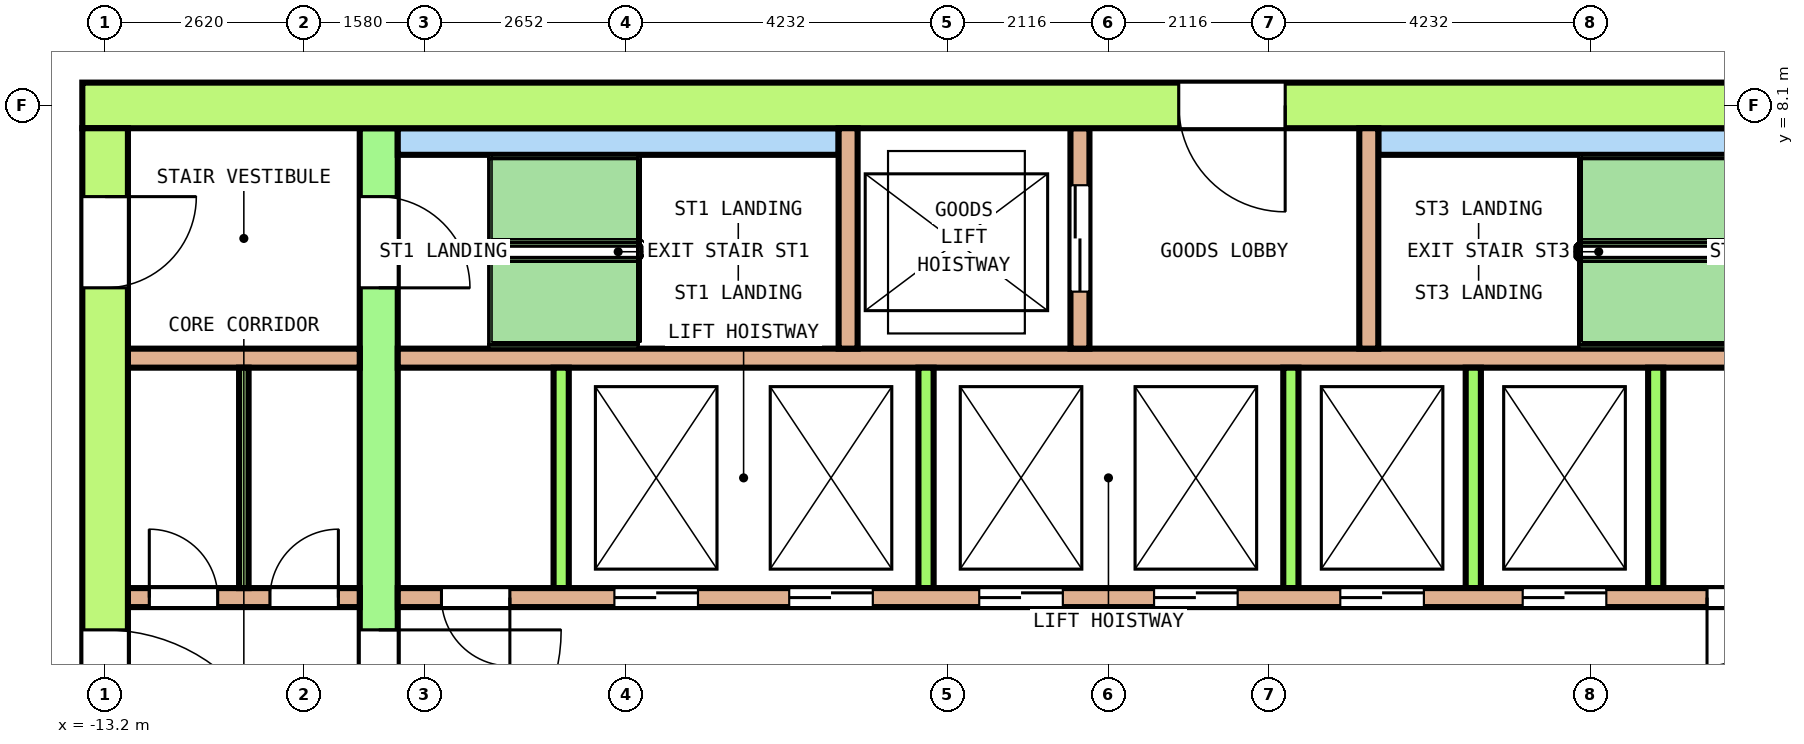
"""IFC4 building model, lengths in metres.
Left out: names, types, materials, properties, quantities, classifications, styles, units other than length and angle.
Written with IfcOpenShell. Run it as: python <this file> out.ifc"""

import sys

from ifc_helpers import new_model, si_unit, direction, frame, frame_2d, origin, place, context, subcontext, project, spatial, rectangle, extrude, element, fill, save


model = new_model("IFC4")
c1 = context("Model", 3, precision=1e-05, world=origin(), true_north=direction((0.0, 1.0)))
c2 = subcontext(c1, "Body", "Model", "MODEL_VIEW")
j1 = project(units=[si_unit("LENGTHUNIT", "METRE"), si_unit("PLANEANGLEUNIT", "RADIAN")], contexts=[c1])
p1 = place(None, origin())
s1 = spatial("IfcSite", under=j1, at=p1, CompositionType="ELEMENT")
p2 = place(p1, origin())
s2 = spatial("IfcBuilding", under=s1, at=p2, CompositionType="ELEMENT")
p3 = place(p2, frame((0.0, 0.0, 231.4)))
s3 = spatial("IfcBuildingStorey", under=s2, at=p3, CompositionType="ELEMENT", Elevation=231.4)
p4 = place(p3, frame((-13.5, 8.1, 0.0), z_axis=(0.0, 0.0, 1.0), x_axis=(1.0, 0.0, 0.0)))
e1 = element("IfcWall", 1, at=p4, inside=s3, PredefinedType="SHEAR", context=c2, shape_type="SweptSolid", body=[
    extrude(rectangle(XDim=27.0, YDim=0.6, at=frame_2d((13.5, 0.0))), origin(), (0.0, 0.0, 1.0), 5.7),
])
p5 = place(p4, frame((14.425, 0.0, 0.0)))
e2 = element("IfcOpeningElement", 2, at=p5, cuts=e1, PredefinedType="OPENING", context=c2, shape_type="SweptSolid", body=[
    extrude(rectangle(XDim=1.4, YDim=2.1, at=frame_2d((0.7, 1.05))), frame((0.0, 0.31, 0.0), z_axis=(0.0, -1.0, 0.0), x_axis=(1.0, 0.0, 0.0)), (0.0, 0.0, 1.0), 0.62),
])
p6 = place(p3, frame((-13.2, -7.8, 0.0), z_axis=(0.0, 0.0, 1.0), x_axis=(0.0, 1.0, 0.0)))
e3 = element("IfcWall", 3, at=p6, inside=s3, PredefinedType="SHEAR", context=c2, shape_type="SweptSolid", body=[
    extrude(rectangle(XDim=15.6, YDim=0.6, at=frame_2d((7.8, 0.0))), origin(), (0.0, 0.0, 1.0), 5.7),
])
p7 = place(p6, frame((6.6, 0.0, 0.0)))
e4 = element("IfcOpeningElement", 4, at=p7, cuts=e3, PredefinedType="OPENING", context=c2, shape_type="SweptSolid", body=[
    extrude(rectangle(XDim=2.4, YDim=2.1, at=frame_2d((1.2, 1.05))), frame((0.0, 0.31, 0.0), z_axis=(0.0, -1.0, 0.0), x_axis=(1.0, 0.0, 0.0)), (0.0, 0.0, 1.0), 0.62),
])
p8 = place(p6, frame((13.5, 0.0, 0.0)))
e5 = element("IfcOpeningElement", 5, at=p8, cuts=e3, PredefinedType="OPENING", context=c2, shape_type="SweptSolid", body=[
    extrude(rectangle(XDim=1.2, YDim=2.1, at=frame_2d((0.6, 1.05))), frame((0.0, 0.31, 0.0), z_axis=(0.0, -1.0, 0.0), x_axis=(1.0, 0.0, 0.0)), (0.0, 0.0, 1.0), 0.62),
])
p9 = place(p6, frame((0.9, 0.0, 0.0)))
e6 = element("IfcOpeningElement", 6, at=p9, cuts=e3, PredefinedType="OPENING", context=c2, shape_type="SweptSolid", body=[
    extrude(rectangle(XDim=1.2, YDim=2.1, at=frame_2d((0.6, 1.05))), frame((0.0, 0.31, 0.0), z_axis=(0.0, -1.0, 0.0), x_axis=(1.0, 0.0, 0.0)), (0.0, 0.0, 1.0), 0.62),
])
p10 = place(p3, frame((-9.6, -7.8, 0.0), z_axis=(0.0, 0.0, 1.0), x_axis=(0.0, 1.0, 0.0)))
e7 = element("IfcWall", 7, at=p10, inside=s3, PredefinedType="SHEAR", context=c2, shape_type="SweptSolid", body=[
    extrude(rectangle(XDim=15.6, YDim=0.5, at=frame_2d((7.8, 0.0))), origin(), (0.0, 0.0, 1.0), 5.7),
])
p11 = place(p10, frame((6.6, 0.0, 0.0)))
e8 = element("IfcOpeningElement", 8, at=p11, cuts=e7, PredefinedType="OPENING", context=c2, shape_type="SweptSolid", body=[
    extrude(rectangle(XDim=2.4, YDim=2.1, at=frame_2d((1.2, 1.05))), frame((0.0, 0.26, 0.0), z_axis=(0.0, -1.0, 0.0), x_axis=(1.0, 0.0, 0.0)), (0.0, 0.0, 1.0), 0.52),
])
p12 = place(p10, frame((13.5, 0.0, 0.0)))
e9 = element("IfcOpeningElement", 9, at=p12, cuts=e7, PredefinedType="OPENING", context=c2, shape_type="SweptSolid", body=[
    extrude(rectangle(XDim=1.2, YDim=2.1, at=frame_2d((0.6, 1.05))), frame((0.0, 0.26, 0.0), z_axis=(0.0, -1.0, 0.0), x_axis=(1.0, 0.0, 0.0)), (0.0, 0.0, 1.0), 0.52),
])
p13 = place(p10, frame((0.9, 0.0, 0.0)))
e10 = element("IfcOpeningElement", 10, at=p13, cuts=e7, PredefinedType="OPENING", context=c2, shape_type="SweptSolid", body=[
    extrude(rectangle(XDim=1.2, YDim=2.1, at=frame_2d((0.6, 1.05))), frame((0.0, 0.26, 0.0), z_axis=(0.0, -1.0, 0.0), x_axis=(1.0, 0.0, 0.0)), (0.0, 0.0, 1.0), 0.52),
])
p14 = place(p3, frame((-12.9, 1.625, 0.0), z_axis=(0.0, 0.0, 1.0), x_axis=(1.0, 0.0, 0.0)))
e11 = element("IfcWall", 11, at=p14, inside=s3, PredefinedType="SOLIDWALL", context=c2, shape_type="SweptSolid", body=[
    extrude(rectangle(XDim=3.05, YDim=0.25, at=frame_2d((1.525, 0.0))), origin(), (0.0, 0.0, 1.0), 5.7),
])
p15 = place(p14, frame((0.281, 0.0, 0.0)))
e12 = element("IfcOpeningElement", 12, at=p15, cuts=e11, PredefinedType="OPENING", context=c2, shape_type="SweptSolid", body=[
    extrude(rectangle(XDim=0.9, YDim=2.1, at=frame_2d((0.45, 1.05))), frame((0.0, 0.135, 0.0), z_axis=(0.0, -1.0, 0.0), x_axis=(1.0, 0.0, 0.0)), (0.0, 0.0, 1.0), 0.27),
])
p16 = place(p14, frame((1.869, 0.0, 0.0)))
e13 = element("IfcOpeningElement", 13, at=p16, cuts=e11, PredefinedType="OPENING", context=c2, shape_type="SweptSolid", body=[
    extrude(rectangle(XDim=0.9, YDim=2.1, at=frame_2d((0.45, 1.05))), frame((0.0, 0.135, 0.0), z_axis=(0.0, -1.0, 0.0), x_axis=(1.0, 0.0, 0.0)), (0.0, 0.0, 1.0), 0.27),
])
p17 = place(p3, frame((-9.35, 1.625, 0.0), z_axis=(0.0, 0.0, 1.0), x_axis=(1.0, 0.0, 0.0)))
e14 = element("IfcWall", 14, at=p17, inside=s3, PredefinedType="SOLIDWALL", context=c2, shape_type="SweptSolid", body=[
    extrude(rectangle(XDim=18.7, YDim=0.25, at=frame_2d((9.35, 0.0))), origin(), (0.0, 0.0, 1.0), 5.7),
])
p18 = place(p17, frame((2.85, 0.0, 0.0)))
e15 = element("IfcOpeningElement", 15, at=p18, cuts=e14, PredefinedType="OPENING", context=c2, shape_type="SweptSolid", body=[
    extrude(rectangle(XDim=1.1, YDim=2.1, at=frame_2d((0.55, 1.05))), frame((0.0, 0.135, 0.0), z_axis=(0.0, -1.0, 0.0), x_axis=(1.0, 0.0, 0.0)), (0.0, 0.0, 1.0), 0.27),
])
p19 = place(p17, frame((5.15, 0.0, 0.0)))
e16 = element("IfcOpeningElement", 16, at=p19, cuts=e14, PredefinedType="OPENING", context=c2, shape_type="SweptSolid", body=[
    extrude(rectangle(XDim=1.1, YDim=2.1, at=frame_2d((0.55, 1.05))), frame((0.0, 0.135, 0.0), z_axis=(0.0, -1.0, 0.0), x_axis=(1.0, 0.0, 0.0)), (0.0, 0.0, 1.0), 0.27),
])
p20 = place(p17, frame((7.65, 0.0, 0.0)))
e17 = element("IfcOpeningElement", 17, at=p20, cuts=e14, PredefinedType="OPENING", context=c2, shape_type="SweptSolid", body=[
    extrude(rectangle(XDim=1.1, YDim=2.1, at=frame_2d((0.55, 1.05))), frame((0.0, 0.135, 0.0), z_axis=(0.0, -1.0, 0.0), x_axis=(1.0, 0.0, 0.0)), (0.0, 0.0, 1.0), 0.27),
])
p21 = place(p17, frame((9.95, 0.0, 0.0)))
e18 = element("IfcOpeningElement", 18, at=p21, cuts=e14, PredefinedType="OPENING", context=c2, shape_type="SweptSolid", body=[
    extrude(rectangle(XDim=1.1, YDim=2.1, at=frame_2d((0.55, 1.05))), frame((0.0, 0.135, 0.0), z_axis=(0.0, -1.0, 0.0), x_axis=(1.0, 0.0, 0.0)), (0.0, 0.0, 1.0), 0.27),
])
p22 = place(p17, frame((12.4, 0.0, 0.0)))
e19 = element("IfcOpeningElement", 19, at=p22, cuts=e14, PredefinedType="OPENING", context=c2, shape_type="SweptSolid", body=[
    extrude(rectangle(XDim=1.1, YDim=2.1, at=frame_2d((0.55, 1.05))), frame((0.0, 0.135, 0.0), z_axis=(0.0, -1.0, 0.0), x_axis=(1.0, 0.0, 0.0)), (0.0, 0.0, 1.0), 0.27),
])
p23 = place(p17, frame((14.8, 0.0, 0.0)))
e20 = element("IfcOpeningElement", 20, at=p23, cuts=e14, PredefinedType="OPENING", context=c2, shape_type="SweptSolid", body=[
    extrude(rectangle(XDim=1.1, YDim=2.1, at=frame_2d((0.55, 1.05))), frame((0.0, 0.135, 0.0), z_axis=(0.0, -1.0, 0.0), x_axis=(1.0, 0.0, 0.0)), (0.0, 0.0, 1.0), 0.27),
])
p24 = place(p17, frame((0.575, 0.0, 0.0)))
e21 = element("IfcOpeningElement", 21, at=p24, cuts=e14, PredefinedType="OPENING", context=c2, shape_type="SweptSolid", body=[
    extrude(rectangle(XDim=0.9, YDim=2.1, at=frame_2d((0.45, 1.05))), frame((0.0, 0.135, 0.0), z_axis=(0.0, -1.0, 0.0), x_axis=(1.0, 0.0, 0.0)), (0.0, 0.0, 1.0), 0.27),
])
p25 = place(p17, frame((17.225, 0.0, 0.0)))
e22 = element("IfcOpeningElement", 22, at=p25, cuts=e14, PredefinedType="OPENING", context=c2, shape_type="SweptSolid", body=[
    extrude(rectangle(XDim=0.9, YDim=2.1, at=frame_2d((0.45, 1.05))), frame((0.0, 0.135, 0.0), z_axis=(0.0, -1.0, 0.0), x_axis=(1.0, 0.0, 0.0)), (0.0, 0.0, 1.0), 0.27),
])
p26 = place(p3, frame((-12.9, 4.775, 0.0), z_axis=(0.0, 0.0, 1.0), x_axis=(1.0, 0.0, 0.0)))
e23 = element("IfcWall", 23, at=p26, inside=s3, PredefinedType="SOLIDWALL", context=c2, shape_type="SweptSolid", body=[
    extrude(rectangle(XDim=3.05, YDim=0.25, at=frame_2d((1.525, 0.0))), origin(), (0.0, 0.0, 1.0), 5.7),
])
p27 = place(p3, frame((-9.35, 4.775, 0.0), z_axis=(0.0, 0.0, 1.0), x_axis=(1.0, 0.0, 0.0)))
e24 = element("IfcWall", 24, at=p27, inside=s3, PredefinedType="SOLIDWALL", context=c2, shape_type="SweptSolid", body=[
    extrude(rectangle(XDim=18.7, YDim=0.25, at=frame_2d((9.35, 0.0))), origin(), (0.0, 0.0, 1.0), 5.7),
])
for number, where, z_axis, x_axis in (
    (25, (-7.2, 1.75, 0.0), (0.0, 0.0, 1.0), (0.0, 1.0, 0.0)),
    (26, (-2.4, 1.75, 0.0), (0.0, 0.0, 1.0), (0.0, 1.0, 0.0)),
    (27, (2.4, 1.75, 0.0), (0.0, 0.0, 1.0), (0.0, 1.0, 0.0)),
    (28, (4.8, 1.75, 0.0), (0.0, 0.0, 1.0), (0.0, 1.0, 0.0)),
    (29, (7.2, 1.75, 0.0), (0.0, 0.0, 1.0), (0.0, 1.0, 0.0)),
):
    element("IfcWall", number, at=place(p3, frame(where, z_axis=z_axis, x_axis=x_axis)), inside=s3, PredefinedType="SOLIDWALL", context=c2, shape_type="SweptSolid", body=[
        extrude(rectangle(XDim=2.9, YDim=0.2, at=frame_2d((1.45, 0.0))), origin(), (0.0, 0.0, 1.0), 5.7),
    ])
for number, where, z_axis, x_axis in (
    (30, (-9.35, 7.625, 0.0), (0.0, 0.0, 1.0), (1.0, 0.0, 0.0)),
    (31, (3.55, 7.625, 0.0), (0.0, 0.0, 1.0), (1.0, 0.0, 0.0)),
):
    element("IfcWall", number, at=place(p3, frame(where, z_axis=z_axis, x_axis=x_axis)), inside=s3, PredefinedType="SOLIDWALL", context=c2, shape_type="SweptSolid", body=[
        extrude(rectangle(XDim=5.8, YDim=0.35, at=frame_2d((2.9, 0.0))), origin(), (0.0, 0.0, 1.0), 5.7),
    ])
p28 = place(p3, frame((-3.425, 4.9, 0.0), z_axis=(0.0, 0.0, 1.0), x_axis=(0.0, 1.0, 0.0)))
e32 = element("IfcWall", 32, at=p28, inside=s3, PredefinedType="SOLIDWALL", context=c2, shape_type="SweptSolid", body=[
    extrude(rectangle(XDim=2.9, YDim=0.25, at=frame_2d((1.45, 0.0))), origin(), (0.0, 0.0, 1.0), 5.7),
])
p29 = place(p3, frame((-0.375, 4.9, 0.0), z_axis=(0.0, 0.0, 1.0), x_axis=(0.0, 1.0, 0.0)))
e33 = element("IfcWall", 33, at=p29, inside=s3, PredefinedType="SOLIDWALL", context=c2, shape_type="SweptSolid", body=[
    extrude(rectangle(XDim=2.9, YDim=0.25, at=frame_2d((1.45, 0.0))), origin(), (0.0, 0.0, 1.0), 5.7),
])
p30 = place(p29, frame((0.75, 0.0, 0.0)))
e34 = element("IfcOpeningElement", 34, at=p30, cuts=e33, PredefinedType="OPENING", context=c2, shape_type="SweptSolid", body=[
    extrude(rectangle(XDim=1.4, YDim=2.1, at=frame_2d((0.7, 1.05))), frame((0.0, 0.135, 0.0), z_axis=(0.0, -1.0, 0.0), x_axis=(1.0, 0.0, 0.0)), (0.0, 0.0, 1.0), 0.27),
])
p31 = place(p3, frame((3.425, 4.9, 0.0), z_axis=(0.0, 0.0, 1.0), x_axis=(0.0, 1.0, 0.0)))
e35 = element("IfcWall", 35, at=p31, inside=s3, PredefinedType="SOLIDWALL", context=c2, shape_type="SweptSolid", body=[
    extrude(rectangle(XDim=2.9, YDim=0.25, at=frame_2d((1.45, 0.0))), origin(), (0.0, 0.0, 1.0), 5.7),
])
p32 = place(p3, frame((-11.375, 1.75, 0.0), z_axis=(0.0, 0.0, 1.0), x_axis=(0.0, 1.0, 0.0)))
e36 = element("IfcWall", 36, at=p32, inside=s3, PredefinedType="PARTITIONING", context=c2, shape_type="SweptSolid", body=[
    extrude(rectangle(XDim=2.9, YDim=0.125, at=frame_2d((1.45, 0.0))), origin(), (0.0, 0.0, 1.0), 5.7),
])
p33 = place(p18, origin())
e37 = element("IfcDoor", 37, at=p33, inside=s3, OperationType="DOUBLE_DOOR_SLIDING", PredefinedType="DOOR", context=c2, shape_type="SweptSolid", body=[
    extrude(rectangle(XDim=1.1, YDim=2.1, at=frame_2d((0.55, 1.05))), frame((0.0, 0.075, 0.0), z_axis=(0.0, -1.0, 0.0), x_axis=(1.0, 0.0, 0.0)), (0.0, 0.0, 1.0), 0.15),
])
fill(e15, e37)
p34 = place(p19, origin())
e38 = element("IfcDoor", 38, at=p34, inside=s3, OperationType="DOUBLE_DOOR_SLIDING", PredefinedType="DOOR", context=c2, shape_type="SweptSolid", body=[
    extrude(rectangle(XDim=1.1, YDim=2.1, at=frame_2d((0.55, 1.05))), frame((0.0, 0.075, 0.0), z_axis=(0.0, -1.0, 0.0), x_axis=(1.0, 0.0, 0.0)), (0.0, 0.0, 1.0), 0.15),
])
fill(e16, e38)
p35 = place(p20, origin())
e39 = element("IfcDoor", 39, at=p35, inside=s3, OperationType="DOUBLE_DOOR_SLIDING", PredefinedType="DOOR", context=c2, shape_type="SweptSolid", body=[
    extrude(rectangle(XDim=1.1, YDim=2.1, at=frame_2d((0.55, 1.05))), frame((0.0, 0.075, 0.0), z_axis=(0.0, -1.0, 0.0), x_axis=(1.0, 0.0, 0.0)), (0.0, 0.0, 1.0), 0.15),
])
fill(e17, e39)
p36 = place(p21, origin())
e40 = element("IfcDoor", 40, at=p36, inside=s3, OperationType="DOUBLE_DOOR_SLIDING", PredefinedType="DOOR", context=c2, shape_type="SweptSolid", body=[
    extrude(rectangle(XDim=1.1, YDim=2.1, at=frame_2d((0.55, 1.05))), frame((0.0, 0.075, 0.0), z_axis=(0.0, -1.0, 0.0), x_axis=(1.0, 0.0, 0.0)), (0.0, 0.0, 1.0), 0.15),
])
fill(e18, e40)
p37 = place(p22, origin())
e41 = element("IfcDoor", 41, at=p37, inside=s3, OperationType="DOUBLE_DOOR_SLIDING", PredefinedType="DOOR", context=c2, shape_type="SweptSolid", body=[
    extrude(rectangle(XDim=1.1, YDim=2.1, at=frame_2d((0.55, 1.05))), frame((0.0, 0.075, 0.0), z_axis=(0.0, -1.0, 0.0), x_axis=(1.0, 0.0, 0.0)), (0.0, 0.0, 1.0), 0.15),
])
fill(e19, e41)
p38 = place(p23, origin())
e42 = element("IfcDoor", 42, at=p38, inside=s3, OperationType="DOUBLE_DOOR_SLIDING", PredefinedType="DOOR", context=c2, shape_type="SweptSolid", body=[
    extrude(rectangle(XDim=1.1, YDim=2.1, at=frame_2d((0.55, 1.05))), frame((0.0, 0.075, 0.0), z_axis=(0.0, -1.0, 0.0), x_axis=(1.0, 0.0, 0.0)), (0.0, 0.0, 1.0), 0.15),
])
fill(e20, e42)
p39 = place(p30, origin())
e43 = element("IfcDoor", 43, at=p39, inside=s3, OperationType="DOUBLE_DOOR_SLIDING", PredefinedType="DOOR", context=c2, shape_type="SweptSolid", body=[
    extrude(rectangle(XDim=1.4, YDim=2.1, at=frame_2d((0.7, 1.05))), frame((0.0, 0.075, 0.0), z_axis=(0.0, -1.0, 0.0), x_axis=(1.0, 0.0, 0.0)), (0.0, 0.0, 1.0), 0.15),
])
fill(e34, e43)
p40 = place(p11, origin())
e44 = element("IfcDoor", 44, at=p40, inside=s3, OperationType="DOUBLE_DOOR_SINGLE_SWING", PredefinedType="DOOR", context=c2, shape_type="SweptSolid", body=[
    extrude(rectangle(XDim=2.4, YDim=2.1, at=frame_2d((1.2, 1.05))), frame((0.0, 0.2, 0.0), z_axis=(0.0, -1.0, 0.0), x_axis=(1.0, 0.0, 0.0)), (0.0, 0.0, 1.0), 0.4),
])
fill(e8, e44)
p41 = place(p7, origin())
e45 = element("IfcDoor", 45, at=p41, inside=s3, OperationType="DOUBLE_DOOR_SINGLE_SWING", PredefinedType="DOOR", context=c2, shape_type="SweptSolid", body=[
    extrude(rectangle(XDim=2.4, YDim=2.1, at=frame_2d((1.2, 1.05))), frame((0.0, 0.25, 0.0), z_axis=(0.0, -1.0, 0.0), x_axis=(1.0, 0.0, 0.0)), (0.0, 0.0, 1.0), 0.5),
])
fill(e4, e45)
p42 = place(p12, origin())
e46 = element("IfcDoor", 46, at=p42, inside=s3, OperationType="SINGLE_SWING_RIGHT", PredefinedType="DOOR", context=c2, shape_type="SweptSolid", body=[
    extrude(rectangle(XDim=1.2, YDim=2.1, at=frame_2d((0.6, 1.05))), frame((0.0, 0.2, 0.0), z_axis=(0.0, -1.0, 0.0), x_axis=(1.0, 0.0, 0.0)), (0.0, 0.0, 1.0), 0.4),
])
fill(e9, e46)
p43 = place(p8, origin())
e47 = element("IfcDoor", 47, at=p43, inside=s3, OperationType="SINGLE_SWING_LEFT", PredefinedType="DOOR", context=c2, shape_type="SweptSolid", body=[
    extrude(rectangle(XDim=1.2, YDim=2.1, at=frame_2d((0.6, 1.05))), frame((0.0, 0.25, 0.0), z_axis=(0.0, -1.0, 0.0), x_axis=(1.0, 0.0, 0.0)), (0.0, 0.0, 1.0), 0.5),
])
fill(e5, e47)
p44 = place(p5, origin())
e48 = element("IfcDoor", 48, at=p44, inside=s3, OperationType="DOUBLE_DOOR_SINGLE_SWING", PredefinedType="DOOR", context=c2, shape_type="SweptSolid", body=[
    extrude(rectangle(XDim=1.4, YDim=2.1, at=frame_2d((0.7, 1.05))), frame((0.0, 0.25, 0.0), z_axis=(0.0, -1.0, 0.0), x_axis=(1.0, 0.0, 0.0)), (0.0, 0.0, 1.0), 0.5),
])
fill(e2, e48)
p45 = place(p15, origin())
e49 = element("IfcDoor", 49, at=p45, inside=s3, OperationType="SINGLE_SWING_RIGHT", PredefinedType="DOOR", context=c2, shape_type="SweptSolid", body=[
    extrude(rectangle(XDim=0.9, YDim=2.1, at=frame_2d((0.45, 1.05))), frame((0.0, 0.075, 0.0), z_axis=(0.0, -1.0, 0.0), x_axis=(1.0, 0.0, 0.0)), (0.0, 0.0, 1.0), 0.15),
])
fill(e12, e49)
p46 = place(p16, origin())
e50 = element("IfcDoor", 50, at=p46, inside=s3, OperationType="SINGLE_SWING_LEFT", PredefinedType="DOOR", context=c2, shape_type="SweptSolid", body=[
    extrude(rectangle(XDim=0.9, YDim=2.1, at=frame_2d((0.45, 1.05))), frame((0.0, 0.075, 0.0), z_axis=(0.0, -1.0, 0.0), x_axis=(1.0, 0.0, 0.0)), (0.0, 0.0, 1.0), 0.15),
])
fill(e13, e50)
p47 = place(p24, origin())
e51 = element("IfcDoor", 51, at=p47, inside=s3, OperationType="SINGLE_SWING_RIGHT", PredefinedType="DOOR", context=c2, shape_type="SweptSolid", body=[
    extrude(rectangle(XDim=0.9, YDim=2.1, at=frame_2d((0.45, 1.05))), frame((0.0, 0.075, 0.0), z_axis=(0.0, -1.0, 0.0), x_axis=(1.0, 0.0, 0.0)), (0.0, 0.0, 1.0), 0.15),
])
fill(e21, e51)
p48 = place(p25, origin())
e52 = element("IfcDoor", 52, at=p48, inside=s3, OperationType="SINGLE_SWING_LEFT", PredefinedType="DOOR", context=c2, shape_type="SweptSolid", body=[
    extrude(rectangle(XDim=0.9, YDim=2.1, at=frame_2d((0.45, 1.05))), frame((0.0, 0.075, 0.0), z_axis=(0.0, -1.0, 0.0), x_axis=(1.0, 0.0, 0.0)), (0.0, 0.0, 1.0), 0.15),
])
fill(e22, e52)
save(model, sys.argv[1])
